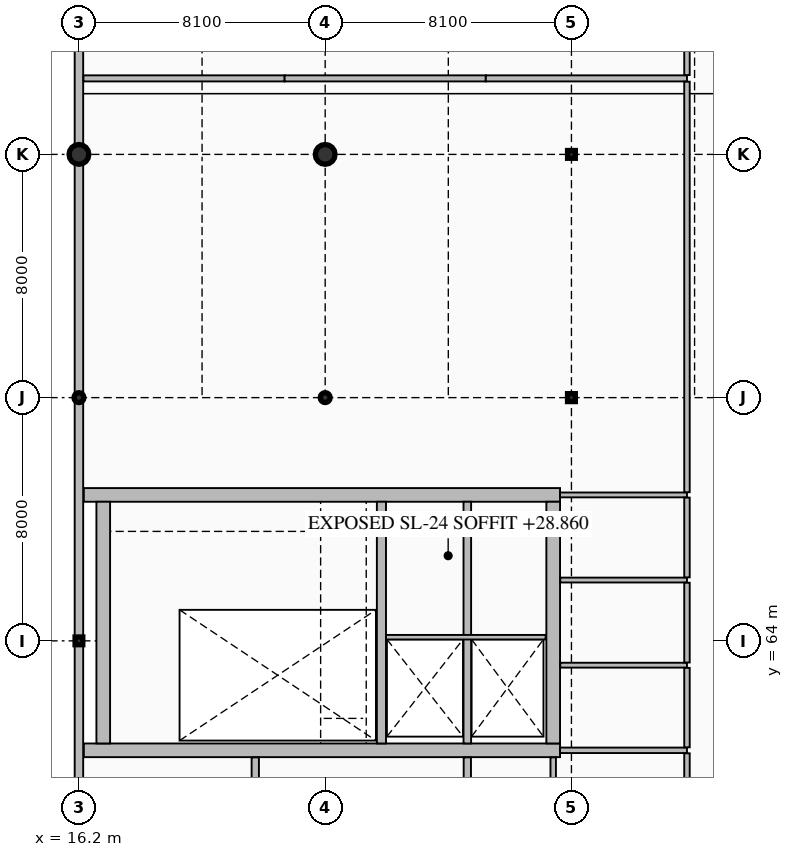
"""IFC4 building model, lengths in metres.
Left out: names, types, materials, properties, quantities, classifications, styles, units other than length and angle.
Written with IfcOpenShell. Run it as: python <this file> out.ifc"""

import sys

from ifc_helpers import new_model, si_unit, direction, frame, frame_2d, origin, origin_2d, place, context, subcontext, project, spatial, rectangle, hollow_rectangle, circle, hollow_circle, i_section, extrude, element, fill, save


model = new_model("IFC4")
c1 = context("Model", 3, precision=1e-05, world=origin(), true_north=direction((0.0, 1.0)))
c2 = subcontext(c1, "Body", "Model", "MODEL_VIEW")
j1 = project(units=[si_unit("LENGTHUNIT", "METRE"), si_unit("PLANEANGLEUNIT", "RADIAN")], contexts=[c1])
p1 = place(None, origin())
s1 = spatial("IfcSite", under=j1, at=p1, CompositionType="ELEMENT")
p2 = place(p1, origin())
s2 = spatial("IfcBuilding", under=s1, at=p2, CompositionType="ELEMENT")
p3 = place(p2, frame((0.0, 0.0, 24.9)))
s3 = spatial("IfcBuildingStorey", under=s2, at=p3, CompositionType="ELEMENT", Elevation=24.9)
p4 = place(p3, frame((16.36, 60.4, 0.0), z_axis=(0.0, 0.0, 1.0), x_axis=(1.0, 0.0, 0.0)))
e1 = element("IfcWall", 1, at=p4, inside=s3, PredefinedType="SHEAR", context=c2, shape_type="SweptSolid", body=[
    extrude(rectangle(XDim=15.665, YDim=0.45, at=frame_2d((7.833, 0.0))), origin(), (0.0, 0.0, 1.0), 4.2),
])
p5 = place(p4, frame((1.39, 0.0, 0.0)))
e2 = element("IfcOpeningElement", 2, at=p5, cuts=e1, PredefinedType="OPENING", context=c2, shape_type="SweptSolid", body=[
    extrude(rectangle(XDim=1.15, YDim=2.25, at=frame_2d((0.575, 1.125))), frame((0.0, 0.235, 0.0), z_axis=(0.0, -1.0, 0.0), x_axis=(1.0, 0.0, 0.0)), (0.0, 0.0, 1.0), 0.47),
])
p6 = place(p4, frame((10.673, 0.0, 0.0)))
e3 = element("IfcOpeningElement", 3, at=p6, cuts=e1, PredefinedType="OPENING", context=c2, shape_type="SweptSolid", body=[
    extrude(rectangle(XDim=1.1, YDim=2.2, at=frame_2d((0.55, 1.1))), frame((0.0, 0.235, 0.0), z_axis=(0.0, -1.0, 0.0), x_axis=(1.0, 0.0, 0.0)), (0.0, 0.0, 1.0), 0.47),
])
p7 = place(p4, frame((13.387, 0.0, 0.0)))
e4 = element("IfcOpeningElement", 4, at=p7, cuts=e1, PredefinedType="OPENING", context=c2, shape_type="SweptSolid", body=[
    extrude(rectangle(XDim=1.1, YDim=2.2, at=frame_2d((0.55, 1.1))), frame((0.0, 0.235, 0.0), z_axis=(0.0, -1.0, 0.0), x_axis=(1.0, 0.0, 0.0)), (0.0, 0.0, 1.0), 0.47),
])
p8 = place(p3, frame((16.36, 68.8, 0.0), z_axis=(0.0, 0.0, 1.0), x_axis=(1.0, 0.0, 0.0)))
e5 = element("IfcWall", 5, at=p8, inside=s3, PredefinedType="SHEAR", context=c2, shape_type="SweptSolid", body=[
    extrude(rectangle(XDim=15.665, YDim=0.45, at=frame_2d((7.833, 0.0))), origin(), (0.0, 0.0, 1.0), 4.2),
])
for number, where, z_axis, x_axis in (
    (6, (17.0, 60.625, 0.0), (0.0, 0.0, 1.0), (0.0, 1.0, 0.0)),
    (7, (31.8, 60.625, 0.0), (0.0, 0.0, 1.0), (0.0, 1.0, 0.0)),
):
    element("IfcWall", number, at=place(p3, frame(where, z_axis=z_axis, x_axis=x_axis)), inside=s3, PredefinedType="SHEAR", context=c2, shape_type="SweptSolid", body=[
        extrude(rectangle(XDim=7.95, YDim=0.45, at=frame_2d((3.975, 0.0))), origin(), (0.0, 0.0, 1.0), 4.2),
    ])
p9 = place(p3, frame((26.15, 60.625, 0.0), z_axis=(0.0, 0.0, 1.0), x_axis=(0.0, 1.0, 0.0)))
e8 = element("IfcWall", 8, at=p9, inside=s3, PredefinedType="SHEAR", context=c2, shape_type="SweptSolid", body=[
    extrude(rectangle(XDim=7.95, YDim=0.3, at=frame_2d((3.975, 0.0))), origin(), (0.0, 0.0, 1.0), 4.2),
])
p10 = place(p3, frame((28.975, 60.625, 0.0), z_axis=(0.0, 0.0, 1.0), x_axis=(0.0, 1.0, 0.0)))
e9 = element("IfcWall", 9, at=p10, inside=s3, PredefinedType="SHEAR", context=c2, shape_type="SweptSolid", body=[
    extrude(rectangle(XDim=7.95, YDim=0.25, at=frame_2d((3.975, 0.0))), origin(), (0.0, 0.0, 1.0), 4.2),
])
p11 = place(p3, frame((16.2, 64.0, 0.0), z_axis=(0.0, 0.0, 1.0), x_axis=(1.0, 0.0, 0.0)))
e10 = element("IfcColumn", 10, at=p11, inside=s3, PredefinedType="COLUMN", context=c2, shape_type="SweptSolid", body=[
    extrude(hollow_rectangle(XDim=0.254, YDim=0.254, WallThickness=0.013, InnerFilletRadius=0.013, OuterFilletRadius=0.025, at=origin_2d()), origin(), (0.0, 0.0, 1.0), 4.2),
])
p12 = place(p3, frame((16.2, 72.0, 0.0), z_axis=(0.0, 0.0, 1.0), x_axis=(1.0, 0.0, 0.0)))
e11 = element("IfcColumn", 11, at=p12, inside=s3, PredefinedType="COLUMN", context=c2, shape_type="SweptSolid", body=[
    extrude(hollow_circle(Radius=0.162, WallThickness=0.013, at=origin_2d()), origin(), (0.0, 0.0, 1.0), 4.2),
])
p13 = place(p3, frame((16.2, 80.0, 0.0), z_axis=(0.0, 0.0, 1.0), x_axis=(1.0, 0.0, 0.0)))
e12 = element("IfcColumn", 12, at=p13, inside=s3, PredefinedType="COLUMN", context=c2, shape_type="SweptSolid", body=[
    extrude(circle(Radius=0.325, at=origin_2d()), origin(), (0.0, 0.0, 1.0), 4.2),
])
p14 = place(p3, frame((24.3, 72.0, 0.0), z_axis=(0.0, 0.0, 1.0), x_axis=(1.0, 0.0, 0.0)))
e13 = element("IfcColumn", 13, at=p14, inside=s3, PredefinedType="COLUMN", context=c2, shape_type="SweptSolid", body=[
    extrude(hollow_circle(Radius=0.162, WallThickness=0.013, at=origin_2d()), origin(), (0.0, 0.0, 1.0), 4.2),
])
p15 = place(p3, frame((24.3, 80.0, 0.0), z_axis=(0.0, 0.0, 1.0), x_axis=(1.0, 0.0, 0.0)))
e14 = element("IfcColumn", 14, at=p15, inside=s3, PredefinedType="COLUMN", context=c2, shape_type="SweptSolid", body=[
    extrude(circle(Radius=0.325, at=origin_2d()), origin(), (0.0, 0.0, 1.0), 4.2),
])
p16 = place(p3, frame((32.4, 72.0, 0.0), z_axis=(0.0, 0.0, 1.0), x_axis=(1.0, 0.0, 0.0)))
e15 = element("IfcColumn", 15, at=p16, inside=s3, PredefinedType="COLUMN", context=c2, shape_type="SweptSolid", body=[
    extrude(i_section(OverallWidth=0.256, OverallDepth=0.26, WebThickness=0.011, FlangeThickness=0.017, FilletRadius=0.013, at=origin_2d()), origin(), (0.0, 0.0, 1.0), 4.2),
])
p17 = place(p3, frame((32.4, 80.0, 0.0), z_axis=(0.0, 0.0, 1.0), x_axis=(1.0, 0.0, 0.0)))
e16 = element("IfcColumn", 16, at=p17, inside=s3, PredefinedType="COLUMN", context=c2, shape_type="SweptSolid", body=[
    extrude(hollow_rectangle(XDim=0.254, YDim=0.254, WallThickness=0.013, InnerFilletRadius=0.013, OuterFilletRadius=0.025, at=origin_2d()), origin(), (0.0, 0.0, 1.0), 4.2),
])
p18 = place(p3, frame((16.2, 96.0, 0.0), z_axis=(0.0, 0.0, 1.0), x_axis=(0.0, -1.0, 0.0)))
e17 = element("IfcWall", 17, at=p18, inside=s3, PredefinedType="SOLIDWALL", context=c2, shape_type="SweptSolid", body=[
    extrude(rectangle(XDim=16.0, YDim=0.28, at=frame_2d((8.0, 0.0))), origin(), (0.0, 0.0, 1.0), 3.489),
])
p19 = place(p3, frame((16.2, 80.0, 0.0), z_axis=(0.0, 0.0, 1.0), x_axis=(0.0, -1.0, 0.0)))
e18 = element("IfcWall", 18, at=p19, inside=s3, PredefinedType="SOLIDWALL", context=c2, shape_type="SweptSolid", body=[
    extrude(rectangle(XDim=16.0, YDim=0.28, at=frame_2d((8.0, 0.0))), origin(), (0.0, 0.0, 1.0), 3.452),
])
p20 = place(p3, frame((16.2, 64.0, 0.0), z_axis=(0.0, 0.0, 1.0), x_axis=(0.0, -1.0, 0.0)))
e19 = element("IfcWall", 19, at=p20, inside=s3, PredefinedType="SOLIDWALL", context=c2, shape_type="SweptSolid", body=[
    extrude(rectangle(XDim=16.0, YDim=0.28, at=frame_2d((8.0, 0.0))), origin(), (0.0, 0.0, 1.0), 3.352),
])
p21 = place(p3, frame((26.3, 64.12, 0.0), z_axis=(0.0, 0.0, 1.0), x_axis=(1.0, 0.0, 0.0)))
e20 = element("IfcWall", 20, at=p21, inside=s3, PredefinedType="PARTITIONING", context=c2, shape_type="SweptSolid", body=[
    extrude(rectangle(XDim=5.25, YDim=0.15, at=frame_2d((2.625, 0.0))), origin(), (0.0, 0.0, 1.0), 3.96),
])
for number, where, z_axis, x_axis in (
    (21, (16.348, 82.5, 0.0), (0.0, 0.0, 1.0), (1.0, 0.0, 0.0)),
    (22, (22.965, 82.5, 0.0), (0.0, 0.0, 1.0), (1.0, 0.0, 0.0)),
):
    element("IfcWall", number, at=place(p3, frame(where, z_axis=z_axis, x_axis=x_axis)), inside=s3, PredefinedType="PARTITIONING", context=c2, shape_type="SweptSolid", body=[
        extrude(rectangle(XDim=6.617, YDim=0.2, at=frame_2d((3.309, 0.0))), origin(), (0.0, 0.0, 1.0), 3.96),
    ])
p22 = place(p3, frame((29.583, 82.5, 0.0), z_axis=(0.0, 0.0, 1.0), x_axis=(1.0, 0.0, 0.0)))
e23 = element("IfcWall", 23, at=p22, inside=s3, PredefinedType="PARTITIONING", context=c2, shape_type="SweptSolid", body=[
    extrude(rectangle(XDim=6.617, YDim=0.2, at=frame_2d((3.309, 0.0))), origin(), (0.0, 0.0, 1.0), 3.96),
])
p23 = place(p3, frame((32.025, 60.4, 0.0), z_axis=(0.0, 0.0, 1.0), x_axis=(1.0, 0.0, 0.0)))
e24 = element("IfcWall", 24, at=p23, inside=s3, PredefinedType="PARTITIONING", context=c2, shape_type="SweptSolid", body=[
    extrude(rectangle(XDim=4.175, YDim=0.18, at=frame_2d((2.087, 0.0))), origin(), (0.0, 0.0, 1.0), 3.96),
])
for number, where, z_axis, x_axis in (
    (25, (32.033, 63.2, 0.0), (0.0, 0.0, 1.0), (1.0, 0.0, 0.0)),
    (26, (32.033, 66.0, 0.0), (0.0, 0.0, 1.0), (1.0, 0.0, 0.0)),
):
    element("IfcWall", number, at=place(p3, frame(where, z_axis=z_axis, x_axis=x_axis)), inside=s3, PredefinedType="PARTITIONING", context=c2, shape_type="SweptSolid", body=[
        extrude(rectangle(XDim=4.167, YDim=0.16, at=frame_2d((2.083, 0.0))), origin(), (0.0, 0.0, 1.0), 3.96),
    ])
p24 = place(p3, frame((32.025, 68.8, 0.0), z_axis=(0.0, 0.0, 1.0), x_axis=(1.0, 0.0, 0.0)))
e27 = element("IfcWall", 27, at=p24, inside=s3, PredefinedType="PARTITIONING", context=c2, shape_type="SweptSolid", body=[
    extrude(rectangle(XDim=4.175, YDim=0.16, at=frame_2d((2.087, 0.0))), origin(), (0.0, 0.0, 1.0), 3.96),
])
p25 = place(p3, frame((22.0, 56.928, 0.0), z_axis=(0.0, 0.0, 1.0), x_axis=(0.0, 1.0, 0.0)))
e28 = element("IfcWall", 28, at=p25, inside=s3, PredefinedType="PARTITIONING", context=c2, shape_type="SweptSolid", body=[
    extrude(rectangle(XDim=3.239, YDim=0.24, at=frame_2d((1.62, 0.0))), origin(), (0.0, 0.0, 1.0), 3.96),
])
p26 = place(p25, frame((1.119, 0.0, 0.0)))
e29 = element("IfcOpeningElement", 29, at=p26, cuts=e28, PredefinedType="OPENING", context=c2, shape_type="SweptSolid", body=[
    extrude(rectangle(XDim=1.0, YDim=2.2, at=frame_2d((0.5, 1.1))), frame((0.0, 0.13, 0.0), z_axis=(0.0, -1.0, 0.0), x_axis=(1.0, 0.0, 0.0)), (0.0, 0.0, 1.0), 0.26),
])
p27 = place(p3, frame((28.975, 56.928, 0.0), z_axis=(0.0, 0.0, 1.0), x_axis=(0.0, 1.0, 0.0)))
e30 = element("IfcWall", 30, at=p27, inside=s3, PredefinedType="PARTITIONING", context=c2, shape_type="SweptSolid", body=[
    extrude(rectangle(XDim=3.239, YDim=0.24, at=frame_2d((1.62, 0.0))), origin(), (0.0, 0.0, 1.0), 3.96),
])
p28 = place(p3, frame((31.8, 56.898, 0.0), z_axis=(0.0, 0.0, 1.0), x_axis=(0.0, 1.0, 0.0)))
e31 = element("IfcWall", 31, at=p28, inside=s3, PredefinedType="PARTITIONING", context=c2, shape_type="SweptSolid", body=[
    extrude(rectangle(XDim=3.269, YDim=0.18, at=frame_2d((1.635, 0.0))), origin(), (0.0, 0.0, 1.0), 3.96),
])
p29 = place(p3, frame((36.2, 56.898, 0.0), z_axis=(0.0, 0.0, 1.0), x_axis=(0.0, 1.0, 0.0)))
e32 = element("IfcWall", 32, at=p29, inside=s3, PredefinedType="PARTITIONING", context=c2, shape_type="SweptSolid", body=[
    extrude(rectangle(XDim=3.404, YDim=0.18, at=frame_2d((1.702, 0.0))), origin(), (0.0, 0.0, 1.0), 3.96),
])
p30 = place(p29, frame((1.202, 0.0, 0.0)))
e33 = element("IfcOpeningElement", 33, at=p30, cuts=e32, PredefinedType="OPENING", context=c2, shape_type="SweptSolid", body=[
    extrude(rectangle(XDim=1.0, YDim=2.15, at=frame_2d((0.5, 1.075))), frame((0.0, 0.1, 0.0), z_axis=(0.0, -1.0, 0.0), x_axis=(1.0, 0.0, 0.0)), (0.0, 0.0, 1.0), 0.2),
])
p31 = place(p3, frame((36.2, 60.498, 0.0), z_axis=(0.0, 0.0, 1.0), x_axis=(0.0, 1.0, 0.0)))
e34 = element("IfcWall", 34, at=p31, inside=s3, PredefinedType="PARTITIONING", context=c2, shape_type="SweptSolid", body=[
    extrude(rectangle(XDim=2.614, YDim=0.18, at=frame_2d((1.307, 0.0))), origin(), (0.0, 0.0, 1.0), 3.96),
])
p32 = place(p31, frame((0.832, 0.0, 0.0)))
e35 = element("IfcOpeningElement", 35, at=p32, cuts=e34, PredefinedType="OPENING", context=c2, shape_type="SweptSolid", body=[
    extrude(rectangle(XDim=0.95, YDim=2.1, at=frame_2d((0.475, 1.05))), frame((0.0, 0.1, 0.0), z_axis=(0.0, -1.0, 0.0), x_axis=(1.0, 0.0, 0.0)), (0.0, 0.0, 1.0), 0.2),
])
p33 = place(p3, frame((36.2, 63.288, 0.0), z_axis=(0.0, 0.0, 1.0), x_axis=(0.0, 1.0, 0.0)))
e36 = element("IfcWall", 36, at=p33, inside=s3, PredefinedType="PARTITIONING", context=c2, shape_type="SweptSolid", body=[
    extrude(rectangle(XDim=2.624, YDim=0.18, at=frame_2d((1.312, 0.0))), origin(), (0.0, 0.0, 1.0), 3.96),
])
p34 = place(p33, frame((0.837, 0.0, 0.0)))
e37 = element("IfcOpeningElement", 37, at=p34, cuts=e36, PredefinedType="OPENING", context=c2, shape_type="SweptSolid", body=[
    extrude(rectangle(XDim=0.95, YDim=2.1, at=frame_2d((0.475, 1.05))), frame((0.0, 0.1, 0.0), z_axis=(0.0, -1.0, 0.0), x_axis=(1.0, 0.0, 0.0)), (0.0, 0.0, 1.0), 0.2),
])
p35 = place(p3, frame((36.2, 66.088, 0.0), z_axis=(0.0, 0.0, 1.0), x_axis=(0.0, 1.0, 0.0)))
e38 = element("IfcWall", 38, at=p35, inside=s3, PredefinedType="PARTITIONING", context=c2, shape_type="SweptSolid", body=[
    extrude(rectangle(XDim=2.624, YDim=0.18, at=frame_2d((1.312, 0.0))), origin(), (0.0, 0.0, 1.0), 3.96),
])
p36 = place(p35, frame((0.812, 0.0, 0.0)))
e39 = element("IfcOpeningElement", 39, at=p36, cuts=e38, PredefinedType="OPENING", context=c2, shape_type="SweptSolid", body=[
    extrude(rectangle(XDim=1.0, YDim=2.15, at=frame_2d((0.5, 1.075))), frame((0.0, 0.1, 0.0), z_axis=(0.0, -1.0, 0.0), x_axis=(1.0, 0.0, 0.0)), (0.0, 0.0, 1.0), 0.2),
])
p37 = place(p3, frame((36.2, 68.888, 0.0), z_axis=(0.0, 0.0, 1.0), x_axis=(0.0, 1.0, 0.0)))
e40 = element("IfcWall", 40, at=p37, inside=s3, PredefinedType="PARTITIONING", context=c2, shape_type="SweptSolid", body=[
    extrude(rectangle(XDim=13.504, YDim=0.18, at=frame_2d((6.752, 0.0))), origin(), (0.0, 0.0, 1.0), 3.545),
])
p38 = place(p37, frame((6.202, 0.0, 0.0)))
e41 = element("IfcOpeningElement", 41, at=p38, cuts=e40, PredefinedType="OPENING", context=c2, shape_type="SweptSolid", body=[
    extrude(rectangle(XDim=1.1, YDim=2.2, at=frame_2d((0.55, 1.1))), frame((0.0, 0.1, 0.0), z_axis=(0.0, -1.0, 0.0), x_axis=(1.0, 0.0, 0.0)), (0.0, 0.0, 1.0), 0.2),
])
p39 = place(p3, frame((36.2, 82.608, 0.0), z_axis=(0.0, 0.0, 1.0), x_axis=(0.0, 1.0, 0.0)))
e42 = element("IfcWall", 42, at=p39, inside=s3, PredefinedType="PARTITIONING", context=c2, shape_type="SweptSolid", body=[
    extrude(rectangle(XDim=14.094, YDim=0.18, at=frame_2d((7.047, 0.0))), origin(), (0.0, 0.0, 1.0), 3.605),
])
p40 = place(p39, frame((6.547, 0.0, 0.0)))
e43 = element("IfcOpeningElement", 43, at=p40, cuts=e42, PredefinedType="OPENING", context=c2, shape_type="SweptSolid", body=[
    extrude(rectangle(XDim=1.0, YDim=2.2, at=frame_2d((0.5, 1.1))), frame((0.0, 0.1, 0.0), z_axis=(0.0, -1.0, 0.0), x_axis=(1.0, 0.0, 0.0)), (0.0, 0.0, 1.0), 0.2),
])
p41 = place(p5, origin())
e44 = element("IfcDoor", 44, at=p41, inside=s3, OperationType="SINGLE_SWING_LEFT", PredefinedType="DOOR", context=c2, shape_type="SweptSolid", body=[
    extrude(rectangle(XDim=1.15, YDim=2.25, at=frame_2d((0.575, 1.125))), frame((0.0, 0.025, 0.0), z_axis=(0.0, -1.0, 0.0), x_axis=(1.0, 0.0, 0.0)), (0.0, 0.0, 1.0), 0.05),
])
fill(e2, e44)
p42 = place(p6, frame((1.1, 0.0, 0.0), z_axis=(0.0, 0.0, 1.0), x_axis=(-1.0, 0.0, 0.0)))
e45 = element("IfcDoor", 45, at=p42, inside=s3, OperationType="DOUBLE_DOOR_SLIDING", PredefinedType="DOOR", context=c2, shape_type="SweptSolid", body=[
    extrude(rectangle(XDim=1.1, YDim=2.2, at=frame_2d((0.55, 1.1))), frame((0.0, 0.025, 0.0), z_axis=(0.0, -1.0, 0.0), x_axis=(1.0, 0.0, 0.0)), (0.0, 0.0, 1.0), 0.05),
])
fill(e3, e45)
p43 = place(p7, frame((1.1, 0.0, 0.0), z_axis=(0.0, 0.0, 1.0), x_axis=(-1.0, 0.0, 0.0)))
e46 = element("IfcDoor", 46, at=p43, inside=s3, OperationType="DOUBLE_DOOR_SLIDING", PredefinedType="DOOR", context=c2, shape_type="SweptSolid", body=[
    extrude(rectangle(XDim=1.1, YDim=2.2, at=frame_2d((0.55, 1.1))), frame((0.0, 0.025, 0.0), z_axis=(0.0, -1.0, 0.0), x_axis=(1.0, 0.0, 0.0)), (0.0, 0.0, 1.0), 0.05),
])
fill(e4, e46)
p44 = place(p32, origin())
e47 = element("IfcDoor", 47, at=p44, inside=s3, OperationType="SINGLE_SWING_LEFT", PredefinedType="DOOR", context=c2, shape_type="SweptSolid", body=[
    extrude(rectangle(XDim=0.95, YDim=2.1, at=frame_2d((0.475, 1.05))), frame((0.0, 0.025, 0.0), z_axis=(0.0, -1.0, 0.0), x_axis=(1.0, 0.0, 0.0)), (0.0, 0.0, 1.0), 0.05),
])
fill(e35, e47)
p45 = place(p34, origin())
e48 = element("IfcDoor", 48, at=p45, inside=s3, OperationType="SINGLE_SWING_RIGHT", PredefinedType="DOOR", context=c2, shape_type="SweptSolid", body=[
    extrude(rectangle(XDim=0.95, YDim=2.1, at=frame_2d((0.475, 1.05))), frame((0.0, 0.025, 0.0), z_axis=(0.0, -1.0, 0.0), x_axis=(1.0, 0.0, 0.0)), (0.0, 0.0, 1.0), 0.05),
])
fill(e37, e48)
p46 = place(p36, origin())
e49 = element("IfcDoor", 49, at=p46, inside=s3, OperationType="SINGLE_SWING_LEFT", PredefinedType="DOOR", context=c2, shape_type="SweptSolid", body=[
    extrude(rectangle(XDim=1.0, YDim=2.15, at=frame_2d((0.5, 1.075))), frame((0.0, 0.025, 0.0), z_axis=(0.0, -1.0, 0.0), x_axis=(1.0, 0.0, 0.0)), (0.0, 0.0, 1.0), 0.05),
])
fill(e39, e49)
p47 = place(p38, origin())
e50 = element("IfcDoor", 50, at=p47, inside=s3, OperationType="SINGLE_SWING_RIGHT", PredefinedType="DOOR", context=c2, shape_type="SweptSolid", body=[
    extrude(rectangle(XDim=1.1, YDim=2.2, at=frame_2d((0.55, 1.1))), frame((0.0, 0.025, 0.0), z_axis=(0.0, -1.0, 0.0), x_axis=(1.0, 0.0, 0.0)), (0.0, 0.0, 1.0), 0.05),
])
fill(e41, e50)
save(model, sys.argv[1])
